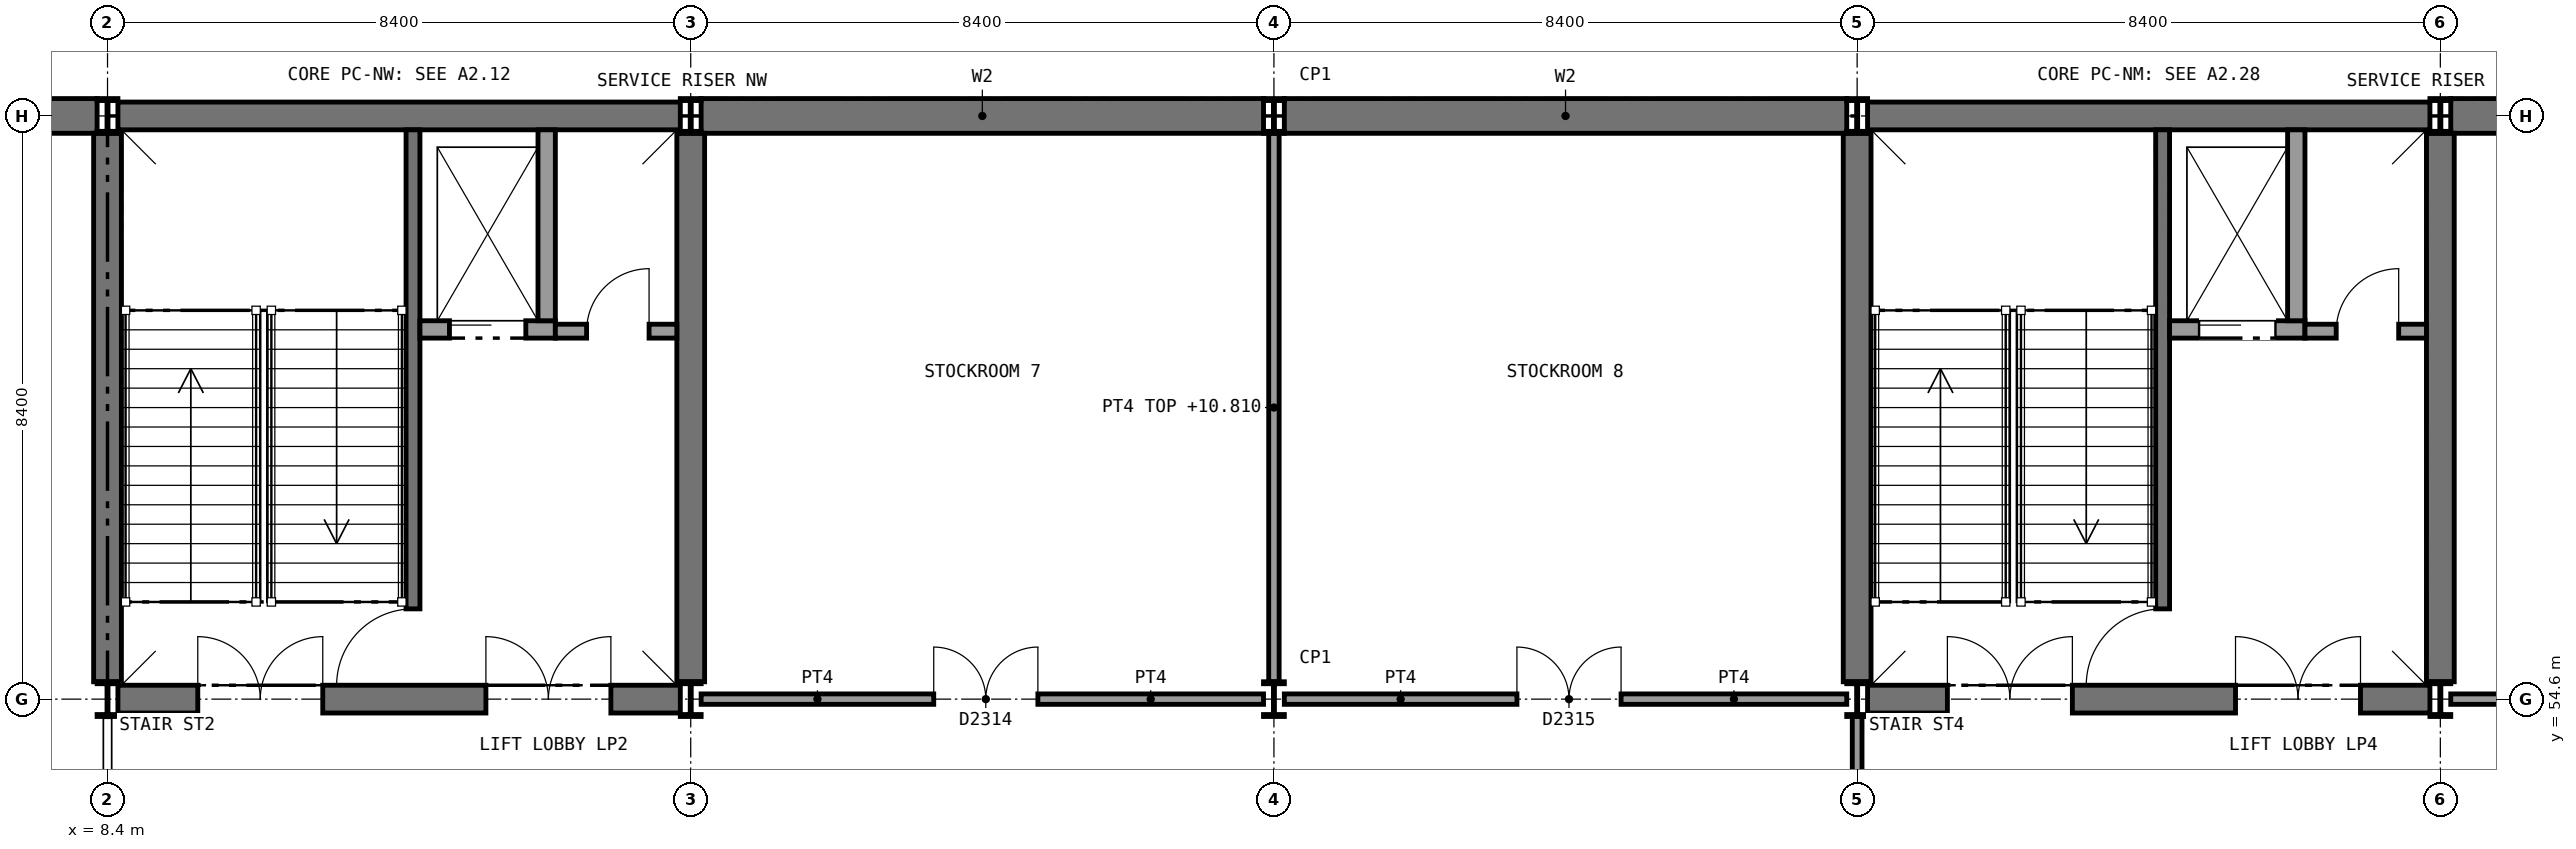
"""IFC4 building model, lengths in metres.
Left out: names, types, materials, properties, quantities, classifications, styles, units other than length and angle.
Written with IfcOpenShell. Run it as: python <this file> out.ifc"""

import sys

from ifc_helpers import new_model, si_unit, direction, frame, frame_2d, origin, origin_2d, place, context, subcontext, project, spatial, rectangle, i_section, extrude, element, fill, save


model = new_model("IFC4")
c1 = context("Model", 3, precision=1e-05, world=origin(), true_north=direction((0.0, 1.0)))
c2 = subcontext(c1, "Body", "Model", "MODEL_VIEW")
j1 = project(units=[si_unit("LENGTHUNIT", "METRE"), si_unit("PLANEANGLEUNIT", "RADIAN")], contexts=[c1])
p1 = place(None, origin())
s1 = spatial("IfcSite", under=j1, at=p1, CompositionType="ELEMENT")
p2 = place(p1, origin())
s2 = spatial("IfcBuilding", under=s1, at=p2, CompositionType="ELEMENT")
p3 = place(p2, frame((0.0, 0.0, 6.0)))
s3 = spatial("IfcBuildingStorey", under=s2, at=p3, CompositionType="ELEMENT", Elevation=6.0)
p4 = place(p3, frame((0.305, 63.0, 0.0), z_axis=(0.0, 0.0, 1.0), x_axis=(1.0, 0.0, 0.0)))
e1 = element("IfcWall", 1, at=p4, inside=s3, PredefinedType="SHEAR", context=c2, shape_type="SweptSolid", body=[
    extrude(rectangle(XDim=7.945, YDim=0.5, at=frame_2d((3.973, 0.0))), origin(), (0.0, 0.0, 1.0), 5.25),
])
p5 = place(p3, frame((16.95, 63.0, 0.0), z_axis=(0.0, 0.0, 1.0), x_axis=(1.0, 0.0, 0.0)))
e2 = element("IfcWall", 2, at=p5, inside=s3, PredefinedType="SHEAR", context=c2, shape_type="SweptSolid", body=[
    extrude(rectangle(XDim=8.1, YDim=0.5, at=frame_2d((4.05, 0.0))), origin(), (0.0, 0.0, 1.0), 5.25),
])
p6 = place(p3, frame((25.35, 63.0, 0.0), z_axis=(0.0, 0.0, 1.0), x_axis=(1.0, 0.0, 0.0)))
e3 = element("IfcWall", 3, at=p6, inside=s3, PredefinedType="SHEAR", context=c2, shape_type="SweptSolid", body=[
    extrude(rectangle(XDim=8.1, YDim=0.5, at=frame_2d((4.05, 0.0))), origin(), (0.0, 0.0, 1.0), 5.25),
])
p7 = place(p3, frame((42.15, 63.0, 0.0), z_axis=(0.0, 0.0, 1.0), x_axis=(1.0, 0.0, 0.0)))
e4 = element("IfcWall", 4, at=p7, inside=s3, PredefinedType="SHEAR", context=c2, shape_type="SweptSolid", body=[
    extrude(rectangle(XDim=8.1, YDim=0.5, at=frame_2d((4.05, 0.0))), origin(), (0.0, 0.0, 1.0), 5.25),
])
p8 = place(p3, frame((8.55, 63.0, 0.0), z_axis=(0.0, 0.0, 1.0), x_axis=(1.0, 0.0, 0.0)))
e5 = element("IfcWall", 5, at=p8, inside=s3, PredefinedType="SHEAR", context=c2, shape_type="SweptSolid", body=[
    extrude(rectangle(XDim=8.1, YDim=0.4, at=frame_2d((4.05, 0.0))), origin(), (0.0, 0.0, 1.0), 5.25),
])
p9 = place(p3, frame((8.55, 54.6, 0.0), z_axis=(0.0, 0.0, 1.0), x_axis=(1.0, 0.0, 0.0)))
e6 = element("IfcWall", 6, at=p9, inside=s3, PredefinedType="SHEAR", context=c2, shape_type="SweptSolid", body=[
    extrude(rectangle(XDim=8.1, YDim=0.4, at=frame_2d((4.05, 0.0))), origin(), (0.0, 0.0, 1.0), 5.25),
])
p10 = place(p9, frame((1.15, 0.0, 0.0)))
e7 = element("IfcOpeningElement", 7, at=p10, cuts=e6, PredefinedType="OPENING", context=c2, shape_type="SweptSolid", body=[
    extrude(rectangle(XDim=1.8, YDim=2.1, at=frame_2d((0.9, 1.05))), frame((0.0, 0.21, 0.0), z_axis=(0.0, -1.0, 0.0), x_axis=(1.0, 0.0, 0.0)), (0.0, 0.0, 1.0), 0.42),
])
p11 = place(p9, frame((5.3, 0.0, 0.0)))
e8 = element("IfcOpeningElement", 8, at=p11, cuts=e6, PredefinedType="OPENING", context=c2, shape_type="SweptSolid", body=[
    extrude(rectangle(XDim=1.8, YDim=2.1, at=frame_2d((0.9, 1.05))), frame((0.0, 0.21, 0.0), z_axis=(0.0, -1.0, 0.0), x_axis=(1.0, 0.0, 0.0)), (0.0, 0.0, 1.0), 0.42),
])
for number, where, z_axis, x_axis in (
    (9, (8.4, 54.85, 0.0), (0.0, 0.0, 1.0), (0.0, 1.0, 0.0)),
    (10, (16.8, 54.85, 0.0), (0.0, 0.0, 1.0), (0.0, 1.0, 0.0)),
):
    element("IfcWall", number, at=place(p3, frame(where, z_axis=z_axis, x_axis=x_axis)), inside=s3, PredefinedType="SHEAR", context=c2, shape_type="SweptSolid", body=[
        extrude(rectangle(XDim=7.9, YDim=0.4, at=frame_2d((3.95, 0.0))), origin(), (0.0, 0.0, 1.0), 5.25),
    ])
p12 = place(p3, frame((33.75, 63.0, 0.0), z_axis=(0.0, 0.0, 1.0), x_axis=(1.0, 0.0, 0.0)))
e11 = element("IfcWall", 11, at=p12, inside=s3, PredefinedType="SHEAR", context=c2, shape_type="SweptSolid", body=[
    extrude(rectangle(XDim=8.1, YDim=0.4, at=frame_2d((4.05, 0.0))), origin(), (0.0, 0.0, 1.0), 5.25),
])
p13 = place(p3, frame((33.75, 54.6, 0.0), z_axis=(0.0, 0.0, 1.0), x_axis=(1.0, 0.0, 0.0)))
e12 = element("IfcWall", 12, at=p13, inside=s3, PredefinedType="SHEAR", context=c2, shape_type="SweptSolid", body=[
    extrude(rectangle(XDim=8.1, YDim=0.4, at=frame_2d((4.05, 0.0))), origin(), (0.0, 0.0, 1.0), 5.25),
])
p14 = place(p13, frame((1.15, 0.0, 0.0)))
e13 = element("IfcOpeningElement", 13, at=p14, cuts=e12, PredefinedType="OPENING", context=c2, shape_type="SweptSolid", body=[
    extrude(rectangle(XDim=1.8, YDim=2.1, at=frame_2d((0.9, 1.05))), frame((0.0, 0.21, 0.0), z_axis=(0.0, -1.0, 0.0), x_axis=(1.0, 0.0, 0.0)), (0.0, 0.0, 1.0), 0.42),
])
p15 = place(p13, frame((5.3, 0.0, 0.0)))
e14 = element("IfcOpeningElement", 14, at=p15, cuts=e12, PredefinedType="OPENING", context=c2, shape_type="SweptSolid", body=[
    extrude(rectangle(XDim=1.8, YDim=2.1, at=frame_2d((0.9, 1.05))), frame((0.0, 0.21, 0.0), z_axis=(0.0, -1.0, 0.0), x_axis=(1.0, 0.0, 0.0)), (0.0, 0.0, 1.0), 0.42),
])
for number, where, z_axis, x_axis in (
    (15, (33.6, 54.85, 0.0), (0.0, 0.0, 1.0), (0.0, 1.0, 0.0)),
    (16, (42.0, 54.85, 0.0), (0.0, 0.0, 1.0), (0.0, 1.0, 0.0)),
):
    element("IfcWall", number, at=place(p3, frame(where, z_axis=z_axis, x_axis=x_axis)), inside=s3, PredefinedType="SHEAR", context=c2, shape_type="SweptSolid", body=[
        extrude(rectangle(XDim=7.9, YDim=0.4, at=frame_2d((3.95, 0.0))), origin(), (0.0, 0.0, 1.0), 5.25),
    ])
for number, where, z_axis, x_axis in (
    (17, (8.4, 54.6, 0.0), (0.0, 0.0, 1.0), (1.0, 0.0, 0.0)),
    (18, (8.4, 63.0, 0.0), (0.0, 0.0, 1.0), (1.0, 0.0, 0.0)),
    (19, (16.8, 54.6, 0.0), (0.0, 0.0, 1.0), (1.0, 0.0, 0.0)),
    (20, (16.8, 63.0, 0.0), (0.0, 0.0, 1.0), (1.0, 0.0, 0.0)),
    (21, (25.2, 54.6, 0.0), (0.0, 0.0, 1.0), (1.0, 0.0, 0.0)),
    (22, (25.2, 63.0, 0.0), (0.0, 0.0, 1.0), (1.0, 0.0, 0.0)),
    (23, (33.6, 54.6, 0.0), (0.0, 0.0, 1.0), (1.0, 0.0, 0.0)),
    (24, (33.6, 63.0, 0.0), (0.0, 0.0, 1.0), (1.0, 0.0, 0.0)),
    (25, (42.0, 54.6, 0.0), (0.0, 0.0, 1.0), (1.0, 0.0, 0.0)),
    (26, (42.0, 63.0, 0.0), (0.0, 0.0, 1.0), (1.0, 0.0, 0.0)),
):
    element("IfcColumn", number, at=place(p3, frame(where, z_axis=z_axis, x_axis=x_axis)), inside=s3, PredefinedType="COLUMN", context=c2, shape_type="SweptSolid", body=[
        extrude(i_section(OverallWidth=0.3, OverallDepth=0.5, WebThickness=0.014, FlangeThickness=0.028, FilletRadius=0.027, at=origin_2d()), origin(), (0.0, 0.0, 1.0), 5.4),
    ])
p16 = place(p3, frame((25.2, 54.85, 0.0), z_axis=(0.0, 0.0, 1.0), x_axis=(0.0, 1.0, 0.0)))
e27 = element("IfcWall", 27, at=p16, inside=s3, PredefinedType="SOLIDWALL", context=c2, shape_type="SweptSolid", body=[
    extrude(rectangle(XDim=7.9, YDim=0.15, at=frame_2d((3.95, 0.0))), origin(), (0.0, 0.0, 1.0), 4.81),
])
p17 = place(p3, frame((16.95, 54.6, 0.0), z_axis=(0.0, 0.0, 1.0), x_axis=(1.0, 0.0, 0.0)))
e28 = element("IfcWall", 28, at=p17, inside=s3, PredefinedType="SOLIDWALL", context=c2, shape_type="SweptSolid", body=[
    extrude(rectangle(XDim=8.1, YDim=0.15, at=frame_2d((4.05, 0.0))), origin(), (0.0, 0.0, 1.0), 4.92),
])
p18 = place(p17, frame((3.35, 0.0, 0.0)))
e29 = element("IfcOpeningElement", 29, at=p18, cuts=e28, PredefinedType="OPENING", context=c2, shape_type="SweptSolid", body=[
    extrude(rectangle(XDim=1.5, YDim=2.1, at=frame_2d((0.75, 1.05))), frame((0.0, 0.085, 0.0), z_axis=(0.0, -1.0, 0.0), x_axis=(1.0, 0.0, 0.0)), (0.0, 0.0, 1.0), 0.17),
])
p19 = place(p3, frame((25.35, 54.6, 0.0), z_axis=(0.0, 0.0, 1.0), x_axis=(1.0, 0.0, 0.0)))
e30 = element("IfcWall", 30, at=p19, inside=s3, PredefinedType="SOLIDWALL", context=c2, shape_type="SweptSolid", body=[
    extrude(rectangle(XDim=8.1, YDim=0.15, at=frame_2d((4.05, 0.0))), origin(), (0.0, 0.0, 1.0), 4.92),
])
p20 = place(p19, frame((3.35, 0.0, 0.0)))
e31 = element("IfcOpeningElement", 31, at=p20, cuts=e30, PredefinedType="OPENING", context=c2, shape_type="SweptSolid", body=[
    extrude(rectangle(XDim=1.5, YDim=2.1, at=frame_2d((0.75, 1.05))), frame((0.0, 0.085, 0.0), z_axis=(0.0, -1.0, 0.0), x_axis=(1.0, 0.0, 0.0)), (0.0, 0.0, 1.0), 0.17),
])
p21 = place(p3, frame((42.15, 54.6, 0.0), z_axis=(0.0, 0.0, 1.0), x_axis=(1.0, 0.0, 0.0)))
e32 = element("IfcWall", 32, at=p21, inside=s3, PredefinedType="SOLIDWALL", context=c2, shape_type="SweptSolid", body=[
    extrude(rectangle(XDim=8.1, YDim=0.15, at=frame_2d((4.05, 0.0))), origin(), (0.0, 0.0, 1.0), 4.92),
])
p22 = place(p21, frame((3.35, 0.0, 0.0)))
e33 = element("IfcOpeningElement", 33, at=p22, cuts=e32, PredefinedType="OPENING", context=c2, shape_type="SweptSolid", body=[
    extrude(rectangle(XDim=1.5, YDim=2.1, at=frame_2d((0.75, 1.05))), frame((0.0, 0.085, 0.0), z_axis=(0.0, -1.0, 0.0), x_axis=(1.0, 0.0, 0.0)), (0.0, 0.0, 1.0), 0.17),
])
p23 = place(p3, frame((33.6, 51.35, 0.0), z_axis=(0.0, 0.0, 1.0), x_axis=(0.0, 1.0, 0.0)))
e34 = element("IfcWall", 34, at=p23, inside=s3, PredefinedType="PARTITIONING", context=c2, shape_type="SweptSolid", body=[
    extrude(rectangle(XDim=3.0, YDim=0.14, at=frame_2d((1.5, 0.0))), origin(), (0.0, 0.0, 1.0), 4.81),
])
p24 = place(p3, frame((12.8, 62.8, 0.0), z_axis=(0.0, 0.0, 1.0), x_axis=(0.0, -1.0, 0.0)))
e35 = element("IfcWall", 35, at=p24, inside=s3, PredefinedType="SHEAR", context=c2, shape_type="SweptSolid", body=[
    extrude(rectangle(XDim=8.0, YDim=0.2, at=frame_2d((4.0, 0.0))), origin(), (0.0, 0.0, 1.0), 5.25),
])
p25 = place(p24, frame((6.9, 0.0, 0.0)))
e36 = element("IfcOpeningElement", 36, at=p25, cuts=e35, PredefinedType="OPENING", context=c2, shape_type="SweptSolid", body=[
    extrude(rectangle(XDim=1.11, YDim=2.1, at=frame_2d((0.555, 1.05))), frame((0.0, 0.11, 0.0), z_axis=(0.0, -1.0, 0.0), x_axis=(1.0, 0.0, 0.0)), (0.0, 0.0, 1.0), 0.22),
])
p26 = place(p3, frame((12.9, 59.925, 0.0), z_axis=(0.0, 0.0, 1.0), x_axis=(1.0, 0.0, 0.0)))
e37 = element("IfcWall", 37, at=p26, inside=s3, PredefinedType="SOLIDWALL", context=c2, shape_type="SweptSolid", body=[
    extrude(rectangle(XDim=1.95, YDim=0.25, at=frame_2d((0.975, 0.0))), origin(), (0.0, 0.0, 1.0), 5.4),
])
p27 = place(p26, frame((0.425, 0.0, 0.0)))
e38 = element("IfcOpeningElement", 38, at=p27, cuts=e37, PredefinedType="OPENING", context=c2, shape_type="SweptSolid", body=[
    extrude(rectangle(XDim=1.1, YDim=2.1, at=frame_2d((0.55, 1.05))), frame((0.0, 0.135, 0.0), z_axis=(0.0, -1.0, 0.0), x_axis=(1.0, 0.0, 0.0)), (0.0, 0.0, 1.0), 0.27),
])
p28 = place(p3, frame((14.725, 62.8, 0.0), z_axis=(0.0, 0.0, 1.0), x_axis=(0.0, -1.0, 0.0)))
e39 = element("IfcWall", 39, at=p28, inside=s3, PredefinedType="SOLIDWALL", context=c2, shape_type="SweptSolid", body=[
    extrude(rectangle(XDim=2.75, YDim=0.25, at=frame_2d((1.375, 0.0))), origin(), (0.0, 0.0, 1.0), 5.4),
])
p29 = place(p3, frame((14.85, 59.9, 0.0), z_axis=(0.0, 0.0, 1.0), x_axis=(1.0, 0.0, 0.0)))
e40 = element("IfcWall", 40, at=p29, inside=s3, PredefinedType="PARTITIONING", context=c2, shape_type="SweptSolid", body=[
    extrude(rectangle(XDim=1.75, YDim=0.2, at=frame_2d((0.875, 0.0))), origin(), (0.0, 0.0, 1.0), 5.25),
])
p30 = place(p29, frame((0.45, 0.0, 0.0)))
e41 = element("IfcOpeningElement", 41, at=p30, cuts=e40, PredefinedType="OPENING", context=c2, shape_type="SweptSolid", body=[
    extrude(rectangle(XDim=0.9, YDim=2.1, at=frame_2d((0.45, 1.05))), frame((0.0, 0.11, 0.0), z_axis=(0.0, -1.0, 0.0), x_axis=(1.0, 0.0, 0.0)), (0.0, 0.0, 1.0), 0.22),
])
p31 = place(p3, frame((38.0, 62.8, 0.0), z_axis=(0.0, 0.0, 1.0), x_axis=(0.0, -1.0, 0.0)))
e42 = element("IfcWall", 42, at=p31, inside=s3, PredefinedType="SHEAR", context=c2, shape_type="SweptSolid", body=[
    extrude(rectangle(XDim=8.0, YDim=0.2, at=frame_2d((4.0, 0.0))), origin(), (0.0, 0.0, 1.0), 5.25),
])
p32 = place(p31, frame((6.9, 0.0, 0.0)))
e43 = element("IfcOpeningElement", 43, at=p32, cuts=e42, PredefinedType="OPENING", context=c2, shape_type="SweptSolid", body=[
    extrude(rectangle(XDim=1.11, YDim=2.1, at=frame_2d((0.555, 1.05))), frame((0.0, 0.11, 0.0), z_axis=(0.0, -1.0, 0.0), x_axis=(1.0, 0.0, 0.0)), (0.0, 0.0, 1.0), 0.22),
])
p33 = place(p3, frame((38.1, 59.925, 0.0), z_axis=(0.0, 0.0, 1.0), x_axis=(1.0, 0.0, 0.0)))
e44 = element("IfcWall", 44, at=p33, inside=s3, PredefinedType="SOLIDWALL", context=c2, shape_type="SweptSolid", body=[
    extrude(rectangle(XDim=1.95, YDim=0.25, at=frame_2d((0.975, 0.0))), origin(), (0.0, 0.0, 1.0), 5.4),
])
p34 = place(p33, frame((0.425, 0.0, 0.0)))
e45 = element("IfcOpeningElement", 45, at=p34, cuts=e44, PredefinedType="OPENING", context=c2, shape_type="SweptSolid", body=[
    extrude(rectangle(XDim=1.1, YDim=2.1, at=frame_2d((0.55, 1.05))), frame((0.0, 0.135, 0.0), z_axis=(0.0, -1.0, 0.0), x_axis=(1.0, 0.0, 0.0)), (0.0, 0.0, 1.0), 0.27),
])
p35 = place(p3, frame((39.925, 62.8, 0.0), z_axis=(0.0, 0.0, 1.0), x_axis=(0.0, -1.0, 0.0)))
e46 = element("IfcWall", 46, at=p35, inside=s3, PredefinedType="SOLIDWALL", context=c2, shape_type="SweptSolid", body=[
    extrude(rectangle(XDim=2.75, YDim=0.25, at=frame_2d((1.375, 0.0))), origin(), (0.0, 0.0, 1.0), 5.4),
])
p36 = place(p3, frame((40.05, 59.9, 0.0), z_axis=(0.0, 0.0, 1.0), x_axis=(1.0, 0.0, 0.0)))
e47 = element("IfcWall", 47, at=p36, inside=s3, PredefinedType="PARTITIONING", context=c2, shape_type="SweptSolid", body=[
    extrude(rectangle(XDim=1.75, YDim=0.2, at=frame_2d((0.875, 0.0))), origin(), (0.0, 0.0, 1.0), 5.25),
])
p37 = place(p36, frame((0.45, 0.0, 0.0)))
e48 = element("IfcOpeningElement", 48, at=p37, cuts=e47, PredefinedType="OPENING", context=c2, shape_type="SweptSolid", body=[
    extrude(rectangle(XDim=0.9, YDim=2.1, at=frame_2d((0.45, 1.05))), frame((0.0, 0.11, 0.0), z_axis=(0.0, -1.0, 0.0), x_axis=(1.0, 0.0, 0.0)), (0.0, 0.0, 1.0), 0.22),
])
p38 = place(p18, origin())
e49 = element("IfcDoor", 49, at=p38, inside=s3, OperationType="DOUBLE_DOOR_SINGLE_SWING", PredefinedType="DOOR", context=c2, shape_type="SweptSolid", body=[
    extrude(rectangle(XDim=1.5, YDim=2.1, at=frame_2d((0.75, 1.05))), frame((0.0, 0.025, 0.0), z_axis=(0.0, -1.0, 0.0), x_axis=(1.0, 0.0, 0.0)), (0.0, 0.0, 1.0), 0.05),
])
fill(e29, e49)
p39 = place(p20, origin())
e50 = element("IfcDoor", 50, at=p39, inside=s3, OperationType="DOUBLE_DOOR_SINGLE_SWING", PredefinedType="DOOR", context=c2, shape_type="SweptSolid", body=[
    extrude(rectangle(XDim=1.5, YDim=2.1, at=frame_2d((0.75, 1.05))), frame((0.0, 0.025, 0.0), z_axis=(0.0, -1.0, 0.0), x_axis=(1.0, 0.0, 0.0)), (0.0, 0.0, 1.0), 0.05),
])
fill(e31, e50)
p40 = place(p25, frame((1.1, 0.0, 0.0), z_axis=(0.0, 0.0, 1.0), x_axis=(-1.0, 0.0, 0.0)))
e51 = element("IfcDoor", 51, at=p40, inside=s3, OperationType="SINGLE_SWING_LEFT", PredefinedType="DOOR", context=c2, shape_type="SweptSolid", body=[
    extrude(rectangle(XDim=1.1, YDim=2.1, at=frame_2d((0.55, 1.05))), frame((0.0, 0.025, 0.0), z_axis=(0.0, -1.0, 0.0), x_axis=(1.0, 0.0, 0.0)), (0.0, 0.0, 1.0), 0.05),
])
fill(e36, e51)
p41 = place(p27, frame((1.1, 0.0, 0.0), z_axis=(0.0, 0.0, 1.0), x_axis=(-1.0, 0.0, 0.0)))
e52 = element("IfcDoor", 52, at=p41, inside=s3, OperationType="SLIDING_TO_RIGHT", PredefinedType="DOOR", context=c2, shape_type="SweptSolid", body=[
    extrude(rectangle(XDim=1.1, YDim=2.1, at=frame_2d((0.55, 1.05))), frame((0.0, 0.025, 0.0), z_axis=(0.0, -1.0, 0.0), x_axis=(1.0, 0.0, 0.0)), (0.0, 0.0, 1.0), 0.05),
])
fill(e38, e52)
p42 = place(p30, origin())
e53 = element("IfcDoor", 53, at=p42, inside=s3, OperationType="SINGLE_SWING_RIGHT", PredefinedType="DOOR", context=c2, shape_type="SweptSolid", body=[
    extrude(rectangle(XDim=0.9, YDim=2.1, at=frame_2d((0.45, 1.05))), frame((0.0, 0.025, 0.0), z_axis=(0.0, -1.0, 0.0), x_axis=(1.0, 0.0, 0.0)), (0.0, 0.0, 1.0), 0.05),
])
fill(e41, e53)
p43 = place(p10, origin())
e54 = element("IfcDoor", 54, at=p43, inside=s3, OperationType="DOUBLE_DOOR_SINGLE_SWING", PredefinedType="DOOR", context=c2, shape_type="SweptSolid", body=[
    extrude(rectangle(XDim=1.8, YDim=2.1, at=frame_2d((0.9, 1.05))), frame((0.0, 0.025, 0.0), z_axis=(0.0, -1.0, 0.0), x_axis=(1.0, 0.0, 0.0)), (0.0, 0.0, 1.0), 0.05),
])
fill(e7, e54)
p44 = place(p11, origin())
e55 = element("IfcDoor", 55, at=p44, inside=s3, OperationType="DOUBLE_DOOR_SINGLE_SWING", PredefinedType="DOOR", context=c2, shape_type="SweptSolid", body=[
    extrude(rectangle(XDim=1.8, YDim=2.1, at=frame_2d((0.9, 1.05))), frame((0.0, 0.025, 0.0), z_axis=(0.0, -1.0, 0.0), x_axis=(1.0, 0.0, 0.0)), (0.0, 0.0, 1.0), 0.05),
])
fill(e8, e55)
p45 = place(p32, frame((1.1, 0.0, 0.0), z_axis=(0.0, 0.0, 1.0), x_axis=(-1.0, 0.0, 0.0)))
e56 = element("IfcDoor", 56, at=p45, inside=s3, OperationType="SINGLE_SWING_LEFT", PredefinedType="DOOR", context=c2, shape_type="SweptSolid", body=[
    extrude(rectangle(XDim=1.1, YDim=2.1, at=frame_2d((0.55, 1.05))), frame((0.0, 0.025, 0.0), z_axis=(0.0, -1.0, 0.0), x_axis=(1.0, 0.0, 0.0)), (0.0, 0.0, 1.0), 0.05),
])
fill(e43, e56)
p46 = place(p34, frame((1.1, 0.0, 0.0), z_axis=(0.0, 0.0, 1.0), x_axis=(-1.0, 0.0, 0.0)))
e57 = element("IfcDoor", 57, at=p46, inside=s3, OperationType="SLIDING_TO_RIGHT", PredefinedType="DOOR", context=c2, shape_type="SweptSolid", body=[
    extrude(rectangle(XDim=1.1, YDim=2.1, at=frame_2d((0.55, 1.05))), frame((0.0, 0.025, 0.0), z_axis=(0.0, -1.0, 0.0), x_axis=(1.0, 0.0, 0.0)), (0.0, 0.0, 1.0), 0.05),
])
fill(e45, e57)
p47 = place(p37, origin())
e58 = element("IfcDoor", 58, at=p47, inside=s3, OperationType="SINGLE_SWING_RIGHT", PredefinedType="DOOR", context=c2, shape_type="SweptSolid", body=[
    extrude(rectangle(XDim=0.9, YDim=2.1, at=frame_2d((0.45, 1.05))), frame((0.0, 0.025, 0.0), z_axis=(0.0, -1.0, 0.0), x_axis=(1.0, 0.0, 0.0)), (0.0, 0.0, 1.0), 0.05),
])
fill(e48, e58)
p48 = place(p14, origin())
e59 = element("IfcDoor", 59, at=p48, inside=s3, OperationType="DOUBLE_DOOR_SINGLE_SWING", PredefinedType="DOOR", context=c2, shape_type="SweptSolid", body=[
    extrude(rectangle(XDim=1.8, YDim=2.1, at=frame_2d((0.9, 1.05))), frame((0.0, 0.025, 0.0), z_axis=(0.0, -1.0, 0.0), x_axis=(1.0, 0.0, 0.0)), (0.0, 0.0, 1.0), 0.05),
])
fill(e13, e59)
p49 = place(p15, origin())
e60 = element("IfcDoor", 60, at=p49, inside=s3, OperationType="DOUBLE_DOOR_SINGLE_SWING", PredefinedType="DOOR", context=c2, shape_type="SweptSolid", body=[
    extrude(rectangle(XDim=1.8, YDim=2.1, at=frame_2d((0.9, 1.05))), frame((0.0, 0.025, 0.0), z_axis=(0.0, -1.0, 0.0), x_axis=(1.0, 0.0, 0.0)), (0.0, 0.0, 1.0), 0.05),
])
fill(e14, e60)
save(model, sys.argv[1])
